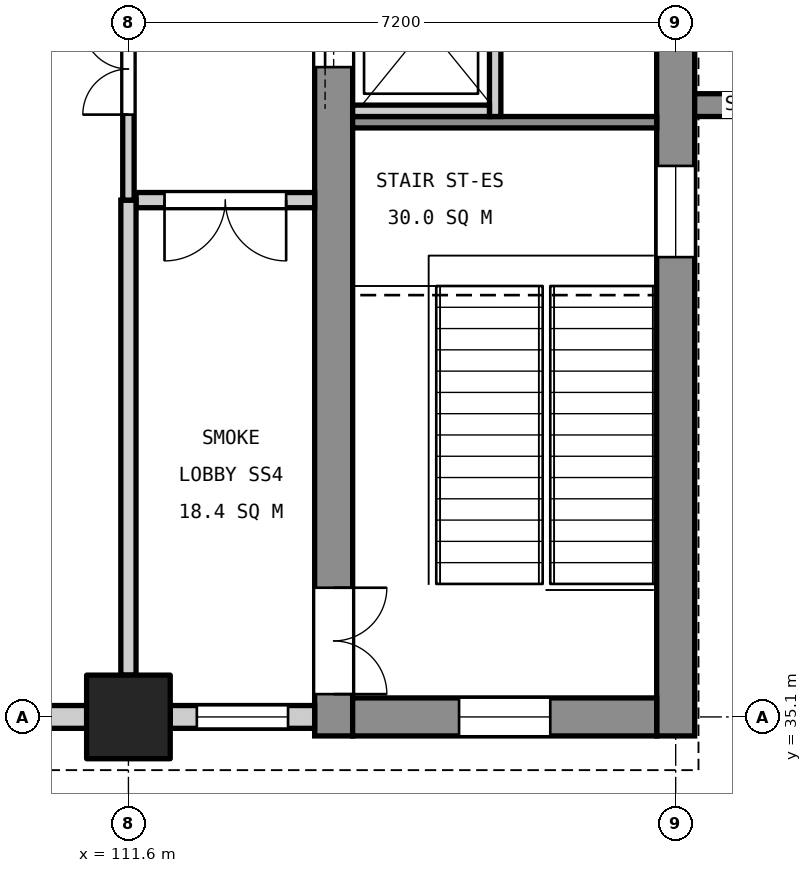
"""IFC4 building model, lengths in metres.
Left out: names, types, materials, properties, quantities, classifications, styles, units other than length and angle.
Written with IfcOpenShell. Run it as: python <this file> out.ifc"""

import sys

from ifc_helpers import new_model, si_unit, direction, frame, frame_2d, origin, origin_2d, place, context, subcontext, project, spatial, rectangle, extrude, element, fill, save


model = new_model("IFC4")
c1 = context("Model", 3, precision=1e-05, world=origin(), true_north=direction((0.0, 1.0)))
c2 = subcontext(c1, "Body", "Model", "MODEL_VIEW")
j1 = project(units=[si_unit("LENGTHUNIT", "METRE"), si_unit("PLANEANGLEUNIT", "RADIAN")], contexts=[c1])
p1 = place(None, origin())
s1 = spatial("IfcSite", under=j1, at=p1, CompositionType="ELEMENT")
p2 = place(p1, origin())
s2 = spatial("IfcBuilding", under=s1, at=p2, CompositionType="ELEMENT")
p3 = place(p2, frame((0.0, 0.0, 16.8)))
s3 = spatial("IfcBuildingStorey", under=s2, at=p3, CompositionType="ELEMENT", Elevation=16.8)
p4 = place(p3, frame((111.6, 35.1, 0.0), z_axis=(0.0, 0.0, 1.0), x_axis=(1.0, 0.0, 0.0)))
e1 = element("IfcColumn", 1, at=p4, inside=s3, PredefinedType="COLUMN", context=c2, shape_type="SweptSolid", body=[
    extrude(rectangle(XDim=1.1, YDim=1.1, at=origin_2d()), origin(), (0.0, 0.0, 1.0), 5.4),
])
p5 = place(p3, frame((118.8, 34.85, 0.0), z_axis=(0.0, 0.0, 1.0), x_axis=(0.0, 1.0, 0.0)))
e2 = element("IfcWall", 2, at=p5, inside=s3, PredefinedType="SHEAR", context=c2, shape_type="SweptSolid", body=[
    extrude(rectangle(XDim=11.3, YDim=0.5, at=frame_2d((5.65, 0.0))), origin(), (0.0, 0.0, 1.0), 5.15),
])
p6 = place(p5, frame((6.3, 0.0, 3.4)))
e3 = element("IfcOpeningElement", 3, at=p6, cuts=e2, PredefinedType="OPENING", context=c2, shape_type="SweptSolid", body=[
    extrude(rectangle(XDim=1.2, YDim=0.9, at=frame_2d((0.6, 0.45))), frame((0.0, 0.26, 0.0), z_axis=(0.0, -1.0, 0.0), x_axis=(1.0, 0.0, 0.0)), (0.0, 0.0, 1.0), 0.52),
])
p7 = place(p3, frame((114.3, 34.85, 0.0), z_axis=(0.0, 0.0, 1.0), x_axis=(0.0, 1.0, 0.0)))
e4 = element("IfcWall", 4, at=p7, inside=s3, PredefinedType="SHEAR", context=c2, shape_type="SweptSolid", body=[
    extrude(rectangle(XDim=11.3, YDim=0.5, at=frame_2d((5.65, 0.0))), origin(), (0.0, 0.0, 1.0), 5.15),
])
p8 = place(p7, frame((0.55, 0.0, 0.0)))
e5 = element("IfcOpeningElement", 5, at=p8, cuts=e4, PredefinedType="OPENING", context=c2, shape_type="SweptSolid", body=[
    extrude(rectangle(XDim=1.4, YDim=2.1, at=frame_2d((0.7, 1.05))), frame((0.0, 0.26, 0.0), z_axis=(0.0, -1.0, 0.0), x_axis=(1.0, 0.0, 0.0)), (0.0, 0.0, 1.0), 0.52),
])
p9 = place(p7, frame((8.8, 0.0, 0.0)))
e6 = element("IfcOpeningElement", 6, at=p9, cuts=e4, PredefinedType="OPENING", context=c2, shape_type="SweptSolid", body=[
    extrude(rectangle(XDim=1.1, YDim=2.1, at=frame_2d((0.55, 1.05))), frame((0.0, 0.26, 0.0), z_axis=(0.0, -1.0, 0.0), x_axis=(1.0, 0.0, 0.0)), (0.0, 0.0, 1.0), 0.52),
])
p10 = place(p3, frame((118.55, 35.1, 0.0), z_axis=(0.0, 0.0, 1.0), x_axis=(-1.0, 0.0, 0.0)))
e7 = element("IfcWall", 7, at=p10, inside=s3, PredefinedType="SHEAR", context=c2, shape_type="SweptSolid", body=[
    extrude(rectangle(XDim=4.0, YDim=0.5, at=frame_2d((2.0, 0.0))), origin(), (0.0, 0.0, 1.0), 5.15),
])
p11 = place(p10, frame((1.4, 0.0, 3.4)))
e8 = element("IfcOpeningElement", 8, at=p11, cuts=e7, PredefinedType="OPENING", context=c2, shape_type="SweptSolid", body=[
    extrude(rectangle(XDim=1.2, YDim=0.9, at=frame_2d((0.6, 0.45))), frame((0.0, 0.26, 0.0), z_axis=(0.0, -1.0, 0.0), x_axis=(1.0, 0.0, 0.0)), (0.0, 0.0, 1.0), 0.52),
])
p12 = place(p3, frame((119.05, 43.15, 0.0), z_axis=(0.0, 0.0, 1.0), x_axis=(1.0, 0.0, 0.0)))
e9 = element("IfcWall", 9, at=p12, inside=s3, PredefinedType="SHEAR", context=c2, shape_type="SweptSolid", body=[
    extrude(rectangle(XDim=1.25, YDim=0.3, at=frame_2d((0.625, 0.0))), origin(), (0.0, 0.0, 1.0), 5.4),
])
p13 = place(p3, frame((118.55, 42.925, 0.0), z_axis=(0.0, 0.0, 1.0), x_axis=(-1.0, 0.0, 0.0)))
e10 = element("IfcWall", 10, at=p13, inside=s3, PredefinedType="SOLIDWALL", context=c2, shape_type="SweptSolid", body=[
    extrude(rectangle(XDim=4.0, YDim=0.15, at=frame_2d((2.0, 0.0))), origin(), (0.0, 0.0, 1.0), 5.15),
])
p14 = place(p3, frame((116.425, 43.0, 0.0), z_axis=(0.0, 0.0, 1.0), x_axis=(0.0, 1.0, 0.0)))
e11 = element("IfcWall", 11, at=p14, inside=s3, PredefinedType="SOLIDWALL", context=c2, shape_type="SweptSolid", body=[
    extrude(rectangle(XDim=2.65, YDim=0.15, at=frame_2d((1.325, 0.0))), origin(), (0.0, 0.0, 1.0), 5.4),
])
p15 = place(p3, frame((116.35, 43.075, 0.0), z_axis=(0.0, 0.0, 1.0), x_axis=(-1.0, 0.0, 0.0)))
e12 = element("IfcWall", 12, at=p15, inside=s3, PredefinedType="SOLIDWALL", context=c2, shape_type="SweptSolid", body=[
    extrude(rectangle(XDim=1.8, YDim=0.15, at=frame_2d((0.9, 0.0))), origin(), (0.0, 0.0, 1.0), 5.4),
])
p16 = place(p3, frame((114.05, 35.1, 0.0), z_axis=(0.0, 0.0, 1.0), x_axis=(-1.0, 0.0, 0.0)))
e13 = element("IfcWall", 13, at=p16, inside=s3, PredefinedType="STANDARD", context=c2, shape_type="SweptSolid", body=[
    extrude(rectangle(XDim=1.9, YDim=0.3, at=frame_2d((0.95, 0.0))), origin(), (0.0, 0.0, 1.0), 4.45),
])
p17 = place(p16, frame((0.35, 0.0, 0.9)))
e14 = element("IfcOpeningElement", 14, at=p17, cuts=e13, PredefinedType="OPENING", context=c2, shape_type="SweptSolid", body=[
    extrude(rectangle(XDim=1.2, YDim=2.4, at=frame_2d((0.6, 1.2))), frame((0.0, 0.16, 0.0), z_axis=(0.0, -1.0, 0.0), x_axis=(1.0, 0.0, 0.0)), (0.0, 0.0, 1.0), 0.32),
])
p18 = place(p3, frame((111.05, 35.1, 0.0), z_axis=(0.0, 0.0, 1.0), x_axis=(-1.0, 0.0, 0.0)))
e15 = element("IfcWall", 15, at=p18, inside=s3, PredefinedType="STANDARD", context=c2, shape_type="SweptSolid", body=[
    extrude(rectangle(XDim=9.7, YDim=0.3, at=frame_2d((4.85, 0.0))), origin(), (0.0, 0.0, 1.0), 4.45),
])
p19 = place(p18, frame((0.625, 0.0, 0.9)))
e16 = element("IfcOpeningElement", 16, at=p19, cuts=e15, PredefinedType="OPENING", context=c2, shape_type="SweptSolid", body=[
    extrude(rectangle(XDim=1.8, YDim=3.0, at=frame_2d((0.9, 1.5))), frame((0.0, 0.16, 0.0), z_axis=(0.0, -1.0, 0.0), x_axis=(1.0, 0.0, 0.0)), (0.0, 0.0, 1.0), 0.32),
])
p20 = place(p18, frame((4.475, 0.0, 0.8)))
e17 = element("IfcOpeningElement", 17, at=p20, cuts=e15, PredefinedType="OPENING", context=c2, shape_type="SweptSolid", body=[
    extrude(rectangle(XDim=0.75, YDim=1.2, at=frame_2d((0.375, 0.6))), frame((0.0, 0.16, 0.0), z_axis=(0.0, -1.0, 0.0), x_axis=(1.0, 0.0, 0.0)), (0.0, 0.0, 1.0), 0.32),
])
p21 = place(p18, frame((7.275, 0.0, 0.9)))
e18 = element("IfcOpeningElement", 18, at=p21, cuts=e15, PredefinedType="OPENING", context=c2, shape_type="SweptSolid", body=[
    extrude(rectangle(XDim=1.8, YDim=3.0, at=frame_2d((0.9, 1.5))), frame((0.0, 0.16, 0.0), z_axis=(0.0, -1.0, 0.0), x_axis=(1.0, 0.0, 0.0)), (0.0, 0.0, 1.0), 0.32),
])
p22 = place(p3, frame((114.05, 41.9, 0.0), z_axis=(0.0, 0.0, 1.0), x_axis=(-1.0, 0.0, 0.0)))
e19 = element("IfcWall", 19, at=p22, inside=s3, PredefinedType="PARTITIONING", context=c2, shape_type="SweptSolid", body=[
    extrude(rectangle(XDim=2.35, YDim=0.2, at=frame_2d((1.175, 0.0))), origin(), (0.0, 0.0, 1.0), 4.05),
])
p23 = place(p22, frame((0.375, 0.0, 0.0)))
e20 = element("IfcOpeningElement", 20, at=p23, cuts=e19, PredefinedType="OPENING", context=c2, shape_type="SweptSolid", body=[
    extrude(rectangle(XDim=1.6, YDim=2.1, at=frame_2d((0.8, 1.05))), frame((0.0, 0.11, 0.0), z_axis=(0.0, -1.0, 0.0), x_axis=(1.0, 0.0, 0.0)), (0.0, 0.0, 1.0), 0.22),
])
p24 = place(p3, frame((111.6, 35.65, 0.0), z_axis=(0.0, 0.0, 1.0), x_axis=(0.0, 1.0, 0.0)))
e21 = element("IfcWall", 21, at=p24, inside=s3, PredefinedType="PARTITIONING", context=c2, shape_type="SweptSolid", body=[
    extrude(rectangle(XDim=6.25, YDim=0.2, at=frame_2d((3.125, 0.0))), origin(), (0.0, 0.0, 1.0), 4.15),
])
p25 = place(p3, frame((111.6, 41.9, 0.0), z_axis=(0.0, 0.0, 1.0), x_axis=(0.0, 1.0, 0.0)))
e22 = element("IfcWall", 22, at=p25, inside=s3, PredefinedType="PARTITIONING", context=c2, shape_type="SweptSolid", body=[
    extrude(rectangle(XDim=3.45, YDim=0.15, at=frame_2d((1.725, 0.0))), origin(), (0.0, 0.0, 1.0), 4.15),
])
p26 = place(p25, frame((1.125, 0.0, 0.0)))
e23 = element("IfcOpeningElement", 23, at=p26, cuts=e22, PredefinedType="OPENING", context=c2, shape_type="SweptSolid", body=[
    extrude(rectangle(XDim=1.2, YDim=2.1, at=frame_2d((0.6, 1.05))), frame((0.0, 0.085, 0.0), z_axis=(0.0, -1.0, 0.0), x_axis=(1.0, 0.0, 0.0)), (0.0, 0.0, 1.0), 0.17),
])
p27 = place(p8, frame((1.4, 0.0, 0.0), z_axis=(0.0, 0.0, 1.0), x_axis=(-1.0, 0.0, 0.0)))
e24 = element("IfcDoor", 24, at=p27, inside=s3, OperationType="DOUBLE_DOOR_SINGLE_SWING", PredefinedType="DOOR", context=c2, shape_type="SweptSolid", body=[
    extrude(rectangle(XDim=1.4, YDim=2.1, at=frame_2d((0.7, 1.05))), frame((0.0, 0.025, 0.0), z_axis=(0.0, -1.0, 0.0), x_axis=(1.0, 0.0, 0.0)), (0.0, 0.0, 1.0), 0.05),
])
fill(e5, e24)
p28 = place(p9, origin())
e25 = element("IfcDoor", 25, at=p28, inside=s3, OperationType="SLIDING_TO_LEFT", PredefinedType="DOOR", context=c2, shape_type="SweptSolid", body=[
    extrude(rectangle(XDim=1.1, YDim=2.1, at=frame_2d((0.55, 1.05))), frame((0.0, 0.025, 0.0), z_axis=(0.0, -1.0, 0.0), x_axis=(1.0, 0.0, 0.0)), (0.0, 0.0, 1.0), 0.05),
])
fill(e6, e25)
p29 = place(p17, origin())
e26 = element("IfcWindow", 26, at=p29, inside=s3, PartitioningType="SINGLE_PANEL", PredefinedType="WINDOW", context=c2, shape_type="SweptSolid", body=[
    extrude(rectangle(XDim=1.2, YDim=2.4, at=frame_2d((0.6, 1.2))), frame((0.0, 0.03, 0.0), z_axis=(0.0, -1.0, 0.0), x_axis=(1.0, 0.0, 0.0)), (0.0, 0.0, 1.0), 0.06),
])
fill(e14, e26)
p30 = place(p6, origin())
e27 = element("IfcWindow", 27, at=p30, inside=s3, PartitioningType="SINGLE_PANEL", PredefinedType="WINDOW", context=c2, shape_type="SweptSolid", body=[
    extrude(rectangle(XDim=1.2, YDim=0.9, at=frame_2d((0.6, 0.45))), frame((0.0, 0.03, 0.0), z_axis=(0.0, -1.0, 0.0), x_axis=(1.0, 0.0, 0.0)), (0.0, 0.0, 1.0), 0.06),
])
fill(e3, e27)
p31 = place(p11, origin())
e28 = element("IfcWindow", 28, at=p31, inside=s3, PartitioningType="SINGLE_PANEL", PredefinedType="WINDOW", context=c2, shape_type="SweptSolid", body=[
    extrude(rectangle(XDim=1.2, YDim=0.9, at=frame_2d((0.6, 0.45))), frame((0.0, 0.03, 0.0), z_axis=(0.0, -1.0, 0.0), x_axis=(1.0, 0.0, 0.0)), (0.0, 0.0, 1.0), 0.06),
])
fill(e8, e28)
p32 = place(p26, origin())
e29 = element("IfcDoor", 29, at=p32, inside=s3, OperationType="DOUBLE_DOOR_SINGLE_SWING", PredefinedType="DOOR", context=c2, shape_type="SweptSolid", body=[
    extrude(rectangle(XDim=1.2, YDim=2.1, at=frame_2d((0.6, 1.05))), frame((0.0, 0.025, 0.0), z_axis=(0.0, -1.0, 0.0), x_axis=(1.0, 0.0, 0.0)), (0.0, 0.0, 1.0), 0.05),
])
fill(e23, e29)
p33 = place(p23, origin())
e30 = element("IfcDoor", 30, at=p33, inside=s3, OperationType="DOUBLE_DOOR_SINGLE_SWING", PredefinedType="DOOR", context=c2, shape_type="SweptSolid", body=[
    extrude(rectangle(XDim=1.6, YDim=2.1, at=frame_2d((0.8, 1.05))), frame((0.0, 0.025, 0.0), z_axis=(0.0, -1.0, 0.0), x_axis=(1.0, 0.0, 0.0)), (0.0, 0.0, 1.0), 0.05),
])
fill(e20, e30)
save(model, sys.argv[1])
